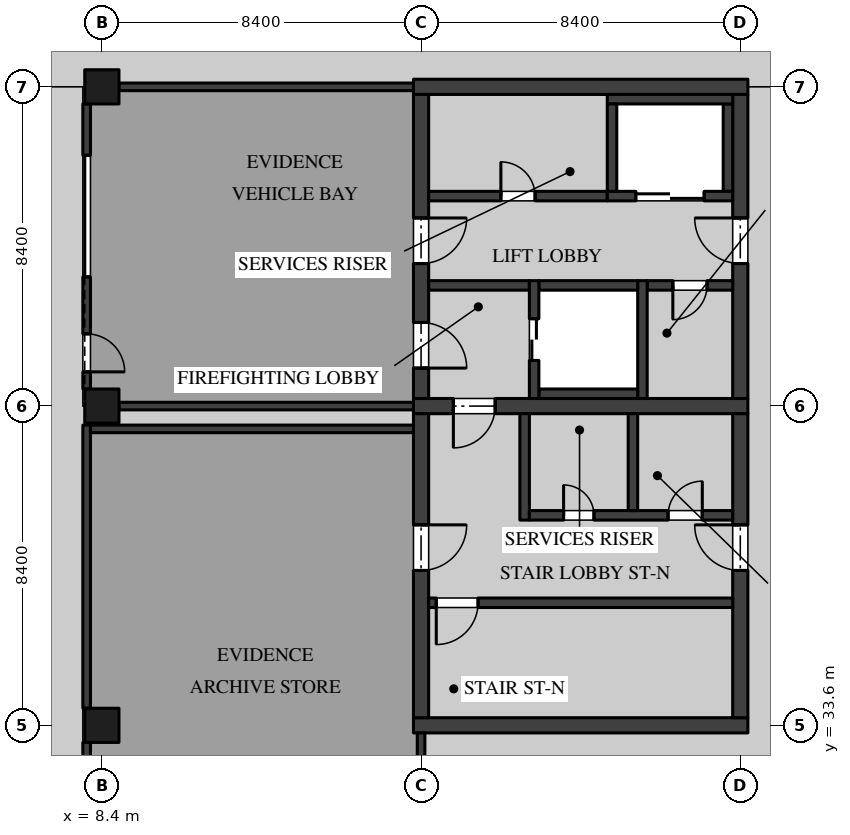
"""IFC4 building model, lengths in metres.
Left out: names, types, materials, properties, quantities, classifications, styles, units other than length and angle.
Written with IfcOpenShell. Run it as: python <this file> out.ifc"""

import sys

from ifc_helpers import new_model, si_unit, direction, frame, frame_2d, origin, origin_2d, place, context, subcontext, project, spatial, rectangle, extrude, element, fill, save


model = new_model("IFC4")
c1 = context("Model", 3, precision=1e-05, world=origin(), true_north=direction((0.0, 1.0)))
c2 = subcontext(c1, "Body", "Model", "MODEL_VIEW")
j1 = project(units=[si_unit("LENGTHUNIT", "METRE"), si_unit("PLANEANGLEUNIT", "RADIAN")], contexts=[c1])
p1 = place(None, origin())
s1 = spatial("IfcSite", under=j1, at=p1, CompositionType="ELEMENT")
p2 = place(p1, origin())
s2 = spatial("IfcBuilding", under=s1, at=p2, CompositionType="ELEMENT")
p3 = place(p2, frame((0.0, 0.0, -4.5)))
s3 = spatial("IfcBuildingStorey", under=s2, at=p3, CompositionType="ELEMENT", Elevation=-4.5)
for number, where, z_axis, x_axis in (
    (1, (8.4, 33.6, 0.0), (0.0, 0.0, 1.0), (1.0, 0.0, 0.0)),
    (2, (8.4, 42.0, 0.0), (0.0, 0.0, 1.0), (1.0, 0.0, 0.0)),
    (3, (8.4, 50.4, 0.0), (0.0, 0.0, 1.0), (1.0, 0.0, 0.0)),
):
    element("IfcColumn", number, at=place(p3, frame(where, z_axis=z_axis, x_axis=x_axis)), inside=s3, PredefinedType="COLUMN", context=c2, shape_type="SweptSolid", body=[
        extrude(rectangle(XDim=0.9, YDim=0.9, at=origin_2d()), origin(), (0.0, 0.0, 1.0), 4.05),
    ])
p4 = place(p3, frame((16.6, 42.0, 0.0), z_axis=(0.0, 0.0, 1.0), x_axis=(1.0, 0.0, 0.0)))
e4 = element("IfcWall", 4, at=p4, inside=s3, PredefinedType="SHEAR", context=c2, shape_type="SweptSolid", body=[
    extrude(rectangle(XDim=8.8, YDim=0.4, at=frame_2d((4.4, 0.0))), origin(), (0.0, 0.0, 1.0), 4.05),
])
p5 = place(p4, frame((1.05, 0.0, 0.0)))
e5 = element("IfcOpeningElement", 5, at=p5, cuts=e4, PredefinedType="OPENING", context=c2, shape_type="SweptSolid", body=[
    extrude(rectangle(XDim=1.1, YDim=2.1, at=frame_2d((0.55, 1.05))), frame((0.0, 0.21, 0.0), z_axis=(0.0, -1.0, 0.0), x_axis=(1.0, 0.0, 0.0)), (0.0, 0.0, 1.0), 0.42),
])
p6 = place(p3, frame((16.6, 50.4, 0.0), z_axis=(0.0, 0.0, 1.0), x_axis=(1.0, 0.0, 0.0)))
e6 = element("IfcWall", 6, at=p6, inside=s3, PredefinedType="SHEAR", context=c2, shape_type="SweptSolid", body=[
    extrude(rectangle(XDim=8.8, YDim=0.4, at=frame_2d((4.4, 0.0))), origin(), (0.0, 0.0, 1.0), 4.05),
])
p7 = place(p3, frame((16.8, 42.2, 0.0), z_axis=(0.0, 0.0, 1.0), x_axis=(0.0, 1.0, 0.0)))
e7 = element("IfcWall", 7, at=p7, inside=s3, PredefinedType="SHEAR", context=c2, shape_type="SweptSolid", body=[
    extrude(rectangle(XDim=8.0, YDim=0.4, at=frame_2d((4.0, 0.0))), origin(), (0.0, 0.0, 1.0), 4.05),
])
p8 = place(p7, frame((3.55, 0.0, 0.0)))
e8 = element("IfcOpeningElement", 8, at=p8, cuts=e7, PredefinedType="OPENING", context=c2, shape_type="SweptSolid", body=[
    extrude(rectangle(XDim=1.2, YDim=2.1, at=frame_2d((0.6, 1.05))), frame((0.0, 0.21, 0.0), z_axis=(0.0, -1.0, 0.0), x_axis=(1.0, 0.0, 0.0)), (0.0, 0.0, 1.0), 0.42),
])
p9 = place(p7, frame((0.8, 0.0, 0.0)))
e9 = element("IfcOpeningElement", 9, at=p9, cuts=e7, PredefinedType="OPENING", context=c2, shape_type="SweptSolid", body=[
    extrude(rectangle(XDim=1.2, YDim=2.1, at=frame_2d((0.6, 1.05))), frame((0.0, 0.21, 0.0), z_axis=(0.0, -1.0, 0.0), x_axis=(1.0, 0.0, 0.0)), (0.0, 0.0, 1.0), 0.42),
])
p10 = place(p3, frame((25.2, 42.2, 0.0), z_axis=(0.0, 0.0, 1.0), x_axis=(0.0, 1.0, 0.0)))
e10 = element("IfcWall", 10, at=p10, inside=s3, PredefinedType="SHEAR", context=c2, shape_type="SweptSolid", body=[
    extrude(rectangle(XDim=8.0, YDim=0.4, at=frame_2d((4.0, 0.0))), origin(), (0.0, 0.0, 1.0), 4.05),
])
p11 = place(p10, frame((3.55, 0.0, 0.0)))
e11 = element("IfcOpeningElement", 11, at=p11, cuts=e10, PredefinedType="OPENING", context=c2, shape_type="SweptSolid", body=[
    extrude(rectangle(XDim=1.2, YDim=2.1, at=frame_2d((0.6, 1.05))), frame((0.0, 0.21, 0.0), z_axis=(0.0, -1.0, 0.0), x_axis=(1.0, 0.0, 0.0)), (0.0, 0.0, 1.0), 0.42),
])
p12 = place(p3, frame((21.7, 47.525, 0.0), z_axis=(0.0, 0.0, 1.0), x_axis=(-1.0, 0.0, 0.0)))
e12 = element("IfcWall", 12, at=p12, inside=s3, PredefinedType="SOLIDWALL", context=c2, shape_type="SweptSolid", body=[
    extrude(rectangle(XDim=4.7, YDim=0.25, at=frame_2d((2.35, 0.0))), origin(), (0.0, 0.0, 1.0), 4.05),
])
p13 = place(p12, frame((1.9, 0.0, 0.0)))
e13 = element("IfcOpeningElement", 13, at=p13, cuts=e12, PredefinedType="OPENING", context=c2, shape_type="SweptSolid", body=[
    extrude(rectangle(XDim=0.9, YDim=2.1, at=frame_2d((0.45, 1.05))), frame((0.0, 0.135, 0.0), z_axis=(0.0, -1.0, 0.0), x_axis=(1.0, 0.0, 0.0)), (0.0, 0.0, 1.0), 0.27),
])
p14 = place(p3, frame((25.0, 45.175, 0.0), z_axis=(0.0, 0.0, 1.0), x_axis=(-1.0, 0.0, 0.0)))
e14 = element("IfcWall", 14, at=p14, inside=s3, PredefinedType="SOLIDWALL", context=c2, shape_type="SweptSolid", body=[
    extrude(rectangle(XDim=2.25, YDim=0.25, at=frame_2d((1.125, 0.0))), origin(), (0.0, 0.0, 1.0), 4.05),
])
p15 = place(p14, frame((0.675, 0.0, 0.0)))
e15 = element("IfcOpeningElement", 15, at=p15, cuts=e14, PredefinedType="OPENING", context=c2, shape_type="SweptSolid", body=[
    extrude(rectangle(XDim=0.9, YDim=2.1, at=frame_2d((0.45, 1.05))), frame((0.0, 0.135, 0.0), z_axis=(0.0, -1.0, 0.0), x_axis=(1.0, 0.0, 0.0)), (0.0, 0.0, 1.0), 0.27),
])
p16 = place(p3, frame((19.65, 45.175, 0.0), z_axis=(0.0, 0.0, 1.0), x_axis=(-1.0, 0.0, 0.0)))
e16 = element("IfcWall", 16, at=p16, inside=s3, PredefinedType="SOLIDWALL", context=c2, shape_type="SweptSolid", body=[
    extrude(rectangle(XDim=2.65, YDim=0.25, at=frame_2d((1.325, 0.0))), origin(), (0.0, 0.0, 1.0), 4.05),
])
p17 = place(p3, frame((16.6, 33.6, 0.0), z_axis=(0.0, 0.0, 1.0), x_axis=(1.0, 0.0, 0.0)))
e17 = element("IfcWall", 17, at=p17, inside=s3, PredefinedType="SHEAR", context=c2, shape_type="SweptSolid", body=[
    extrude(rectangle(XDim=8.8, YDim=0.4, at=frame_2d((4.4, 0.0))), origin(), (0.0, 0.0, 1.0), 4.05),
])
p18 = place(p3, frame((16.8, 33.8, 0.0), z_axis=(0.0, 0.0, 1.0), x_axis=(0.0, 1.0, 0.0)))
e18 = element("IfcWall", 18, at=p18, inside=s3, PredefinedType="SHEAR", context=c2, shape_type="SweptSolid", body=[
    extrude(rectangle(XDim=8.0, YDim=0.4, at=frame_2d((4.0, 0.0))), origin(), (0.0, 0.0, 1.0), 4.05),
])
p19 = place(p18, frame((3.875, 0.0, 0.0)))
e19 = element("IfcOpeningElement", 19, at=p19, cuts=e18, PredefinedType="OPENING", context=c2, shape_type="SweptSolid", body=[
    extrude(rectangle(XDim=1.2, YDim=2.1, at=frame_2d((0.6, 1.05))), frame((0.0, 0.21, 0.0), z_axis=(0.0, -1.0, 0.0), x_axis=(1.0, 0.0, 0.0)), (0.0, 0.0, 1.0), 0.42),
])
p20 = place(p3, frame((25.2, 33.8, 0.0), z_axis=(0.0, 0.0, 1.0), x_axis=(0.0, 1.0, 0.0)))
e20 = element("IfcWall", 20, at=p20, inside=s3, PredefinedType="SHEAR", context=c2, shape_type="SweptSolid", body=[
    extrude(rectangle(XDim=8.0, YDim=0.4, at=frame_2d((4.0, 0.0))), origin(), (0.0, 0.0, 1.0), 4.05),
])
p21 = place(p20, frame((3.875, 0.0, 0.0)))
e21 = element("IfcOpeningElement", 21, at=p21, cuts=e20, PredefinedType="OPENING", context=c2, shape_type="SweptSolid", body=[
    extrude(rectangle(XDim=1.2, YDim=2.1, at=frame_2d((0.6, 1.05))), frame((0.0, 0.21, 0.0), z_axis=(0.0, -1.0, 0.0), x_axis=(1.0, 0.0, 0.0)), (0.0, 0.0, 1.0), 0.42),
])
p22 = place(p3, frame((17.0, 36.825, 0.0), z_axis=(0.0, 0.0, 1.0), x_axis=(1.0, 0.0, 0.0)))
e22 = element("IfcWall", 22, at=p22, inside=s3, PredefinedType="SOLIDWALL", context=c2, shape_type="SweptSolid", body=[
    extrude(rectangle(XDim=8.0, YDim=0.25, at=frame_2d((4.0, 0.0))), origin(), (0.0, 0.0, 1.0), 4.05),
])
p23 = place(p22, frame((0.2, 0.0, 0.0)))
e23 = element("IfcOpeningElement", 23, at=p23, cuts=e22, PredefinedType="OPENING", context=c2, shape_type="SweptSolid", body=[
    extrude(rectangle(XDim=1.1, YDim=2.1, at=frame_2d((0.55, 1.05))), frame((0.0, 0.135, 0.0), z_axis=(0.0, -1.0, 0.0), x_axis=(1.0, 0.0, 0.0)), (0.0, 0.0, 1.0), 0.27),
])
p24 = place(p3, frame((19.525, 39.0, 0.0), z_axis=(0.0, 0.0, 1.0), x_axis=(0.0, 1.0, 0.0)))
e24 = element("IfcWall", 24, at=p24, inside=s3, PredefinedType="SOLIDWALL", context=c2, shape_type="SweptSolid", body=[
    extrude(rectangle(XDim=2.8, YDim=0.25, at=frame_2d((1.4, 0.0))), origin(), (0.0, 0.0, 1.0), 4.05),
])
p25 = place(p3, frame((19.65, 39.125, 0.0), z_axis=(0.0, 0.0, 1.0), x_axis=(1.0, 0.0, 0.0)))
e25 = element("IfcWall", 25, at=p25, inside=s3, PredefinedType="SOLIDWALL", context=c2, shape_type="SweptSolid", body=[
    extrude(rectangle(XDim=5.35, YDim=0.25, at=frame_2d((2.675, 0.0))), origin(), (0.0, 0.0, 1.0), 4.05),
])
p26 = place(p25, frame((3.65, 0.0, 0.0)))
e26 = element("IfcOpeningElement", 26, at=p26, cuts=e25, PredefinedType="OPENING", context=c2, shape_type="SweptSolid", body=[
    extrude(rectangle(XDim=0.9, YDim=2.1, at=frame_2d((0.45, 1.05))), frame((0.0, 0.135, 0.0), z_axis=(0.0, -1.0, 0.0), x_axis=(1.0, 0.0, 0.0)), (0.0, 0.0, 1.0), 0.27),
])
p27 = place(p25, frame((0.9, 0.0, 0.0)))
e27 = element("IfcOpeningElement", 27, at=p27, cuts=e25, PredefinedType="OPENING", context=c2, shape_type="SweptSolid", body=[
    extrude(rectangle(XDim=0.8, YDim=2.1, at=frame_2d((0.4, 1.05))), frame((0.0, 0.135, 0.0), z_axis=(0.0, -1.0, 0.0), x_axis=(1.0, 0.0, 0.0)), (0.0, 0.0, 1.0), 0.27),
])
p28 = place(p3, frame((22.375, 39.25, 0.0), z_axis=(0.0, 0.0, 1.0), x_axis=(0.0, 1.0, 0.0)))
e28 = element("IfcWall", 28, at=p28, inside=s3, PredefinedType="SOLIDWALL", context=c2, shape_type="SweptSolid", body=[
    extrude(rectangle(XDim=2.55, YDim=0.25, at=frame_2d((1.275, 0.0))), origin(), (0.0, 0.0, 1.0), 4.05),
])
p29 = place(p3, frame((24.875, 47.65, 0.0), z_axis=(0.0, 0.0, 1.0), x_axis=(0.0, 1.0, 0.0)))
e29 = element("IfcWall", 29, at=p29, inside=s3, PredefinedType="SOLIDWALL", context=c2, shape_type="SweptSolid", body=[
    extrude(rectangle(XDim=2.3, YDim=0.25, at=frame_2d((1.15, 0.0))), origin(), (0.0, 0.0, 1.0), 4.05),
])
p30 = place(p3, frame((21.7, 50.075, 0.0), z_axis=(0.0, 0.0, 1.0), x_axis=(1.0, 0.0, 0.0)))
e30 = element("IfcWall", 30, at=p30, inside=s3, PredefinedType="SOLIDWALL", context=c2, shape_type="SweptSolid", body=[
    extrude(rectangle(XDim=3.3, YDim=0.25, at=frame_2d((1.65, 0.0))), origin(), (0.0, 0.0, 1.0), 4.05),
])
p31 = place(p3, frame((21.7, 47.525, 0.0), z_axis=(0.0, 0.0, 1.0), x_axis=(1.0, 0.0, 0.0)))
e31 = element("IfcWall", 31, at=p31, inside=s3, PredefinedType="SOLIDWALL", context=c2, shape_type="SweptSolid", body=[
    extrude(rectangle(XDim=3.3, YDim=0.25, at=frame_2d((1.65, 0.0))), origin(), (0.0, 0.0, 1.0), 4.05),
])
p32 = place(p31, frame((0.75, 0.0, 0.0)))
e32 = element("IfcOpeningElement", 32, at=p32, cuts=e31, PredefinedType="OPENING", context=c2, shape_type="SweptSolid", body=[
    extrude(rectangle(XDim=1.8, YDim=2.1, at=frame_2d((0.9, 1.05))), frame((0.0, 0.135, 0.0), z_axis=(0.0, -1.0, 0.0), x_axis=(1.0, 0.0, 0.0)), (0.0, 0.0, 1.0), 0.27),
])
p33 = place(p3, frame((21.825, 47.65, 0.0), z_axis=(0.0, 0.0, 1.0), x_axis=(0.0, 1.0, 0.0)))
e33 = element("IfcWall", 33, at=p33, inside=s3, PredefinedType="SOLIDWALL", context=c2, shape_type="SweptSolid", body=[
    extrude(rectangle(XDim=2.3, YDim=0.25, at=frame_2d((1.15, 0.0))), origin(), (0.0, 0.0, 1.0), 4.05),
])
p34 = place(p3, frame((22.625, 42.2, 0.0), z_axis=(0.0, 0.0, 1.0), x_axis=(0.0, 1.0, 0.0)))
e34 = element("IfcWall", 34, at=p34, inside=s3, PredefinedType="SOLIDWALL", context=c2, shape_type="SweptSolid", body=[
    extrude(rectangle(XDim=3.1, YDim=0.25, at=frame_2d((1.55, 0.0))), origin(), (0.0, 0.0, 1.0), 4.05),
])
for number, where, z_axis, x_axis in (
    (35, (19.9, 45.175, 0.0), (0.0, 0.0, 1.0), (1.0, 0.0, 0.0)),
    (36, (19.9, 42.325, 0.0), (0.0, 0.0, 1.0), (1.0, 0.0, 0.0)),
):
    element("IfcWall", number, at=place(p3, frame(where, z_axis=z_axis, x_axis=x_axis)), inside=s3, PredefinedType="SOLIDWALL", context=c2, shape_type="SweptSolid", body=[
        extrude(rectangle(XDim=2.6, YDim=0.25, at=frame_2d((1.3, 0.0))), origin(), (0.0, 0.0, 1.0), 4.05),
    ])
p35 = place(p3, frame((19.775, 42.2, 0.0), z_axis=(0.0, 0.0, 1.0), x_axis=(0.0, 1.0, 0.0)))
e37 = element("IfcWall", 37, at=p35, inside=s3, PredefinedType="SOLIDWALL", context=c2, shape_type="SweptSolid", body=[
    extrude(rectangle(XDim=3.1, YDim=0.25, at=frame_2d((1.55, 0.0))), origin(), (0.0, 0.0, 1.0), 4.05),
])
p36 = place(p35, frame((1.0, 0.0, 0.0)))
e38 = element("IfcOpeningElement", 38, at=p36, cuts=e37, PredefinedType="OPENING", context=c2, shape_type="SweptSolid", body=[
    extrude(rectangle(XDim=1.1, YDim=2.1, at=frame_2d((0.55, 1.05))), frame((0.0, 0.135, 0.0), z_axis=(0.0, -1.0, 0.0), x_axis=(1.0, 0.0, 0.0)), (0.0, 0.0, 1.0), 0.27),
])
p37 = place(p3, frame((8.85, 50.4, 0.0), z_axis=(0.0, 0.0, 1.0), x_axis=(1.0, 0.0, 0.0)))
e39 = element("IfcWall", 39, at=p37, inside=s3, PredefinedType="PARTITIONING", context=c2, shape_type="SweptSolid", body=[
    extrude(rectangle(XDim=7.75, YDim=0.2, at=frame_2d((3.875, 0.0))), origin(), (0.0, 0.0, 1.0), 4.05),
])
p38 = place(p3, frame((8.0, 42.45, 0.0), z_axis=(0.0, 0.0, 1.0), x_axis=(0.0, 1.0, 0.0)))
e40 = element("IfcWall", 40, at=p38, inside=s3, PredefinedType="PARTITIONING", context=c2, shape_type="SweptSolid", body=[
    extrude(rectangle(XDim=7.5, YDim=0.2, at=frame_2d((3.75, 0.0))), origin(), (0.0, 0.0, 1.0), 4.05),
])
p39 = place(p38, frame((0.45, 0.0, 0.0)))
e41 = element("IfcOpeningElement", 41, at=p39, cuts=e40, PredefinedType="OPENING", context=c2, shape_type="SweptSolid", body=[
    extrude(rectangle(XDim=1.0, YDim=2.1, at=frame_2d((0.5, 1.05))), frame((0.0, 0.11, 0.0), z_axis=(0.0, -1.0, 0.0), x_axis=(1.0, 0.0, 0.0)), (0.0, 0.0, 1.0), 0.22),
])
p40 = place(p38, frame((2.95, 0.0, 0.0)))
e42 = element("IfcOpeningElement", 42, at=p40, cuts=e40, PredefinedType="OPENING", context=c2, shape_type="SweptSolid", body=[
    extrude(rectangle(XDim=3.2, YDim=3.0, at=frame_2d((1.6, 1.5))), frame((0.0, 0.11, 0.0), z_axis=(0.0, -1.0, 0.0), x_axis=(1.0, 0.0, 0.0)), (0.0, 0.0, 1.0), 0.22),
])
p41 = place(p3, frame((8.85, 42.0, 0.0), z_axis=(0.0, 0.0, 1.0), x_axis=(1.0, 0.0, 0.0)))
e43 = element("IfcWall", 43, at=p41, inside=s3, PredefinedType="PARTITIONING", context=c2, shape_type="SweptSolid", body=[
    extrude(rectangle(XDim=7.75, YDim=0.2, at=frame_2d((3.875, 0.0))), origin(), (0.0, 0.0, 1.0), 4.05),
])
p42 = place(p3, frame((8.0, 25.5, 0.0), z_axis=(0.0, 0.0, 1.0), x_axis=(0.0, 1.0, 0.0)))
e44 = element("IfcWall", 44, at=p42, inside=s3, PredefinedType="PARTITIONING", context=c2, shape_type="SweptSolid", body=[
    extrude(rectangle(XDim=7.65, YDim=0.2, at=frame_2d((3.825, 0.0))), origin(), (0.0, 0.0, 1.0), 4.05),
])
p43 = place(p3, frame((8.0, 34.05, 0.0), z_axis=(0.0, 0.0, 1.0), x_axis=(0.0, 1.0, 0.0)))
e45 = element("IfcWall", 45, at=p43, inside=s3, PredefinedType="PARTITIONING", context=c2, shape_type="SweptSolid", body=[
    extrude(rectangle(XDim=7.45, YDim=0.2, at=frame_2d((3.725, 0.0))), origin(), (0.0, 0.0, 1.0), 4.05),
])
p44 = place(p3, frame((8.1, 41.4, 0.0), z_axis=(0.0, 0.0, 1.0), x_axis=(1.0, 0.0, 0.0)))
e46 = element("IfcWall", 46, at=p44, inside=s3, PredefinedType="PARTITIONING", context=c2, shape_type="SweptSolid", body=[
    extrude(rectangle(XDim=8.5, YDim=0.2, at=frame_2d((4.25, 0.0))), origin(), (0.0, 0.0, 1.0), 4.05),
])
p45 = place(p3, frame((16.8, 25.7, 0.0), z_axis=(0.0, 0.0, 1.0), x_axis=(0.0, 1.0, 0.0)))
e47 = element("IfcWall", 47, at=p45, inside=s3, PredefinedType="PARTITIONING", context=c2, shape_type="SweptSolid", body=[
    extrude(rectangle(XDim=7.7, YDim=0.2, at=frame_2d((3.85, 0.0))), origin(), (0.0, 0.0, 1.0), 4.05),
])
p46 = place(p45, frame((3.8, 0.0, 0.0)))
e48 = element("IfcOpeningElement", 48, at=p46, cuts=e47, PredefinedType="OPENING", context=c2, shape_type="SweptSolid", body=[
    extrude(rectangle(XDim=1.0, YDim=2.1, at=frame_2d((0.5, 1.05))), frame((0.0, 0.11, 0.0), z_axis=(0.0, -1.0, 0.0), x_axis=(1.0, 0.0, 0.0)), (0.0, 0.0, 1.0), 0.22),
])
p47 = place(p8, frame((1.2, 0.0, 0.0), z_axis=(0.0, 0.0, 1.0), x_axis=(-1.0, 0.0, 0.0)))
e49 = element("IfcDoor", 49, at=p47, inside=s3, OperationType="SINGLE_SWING_RIGHT", PredefinedType="DOOR", context=c2, shape_type="SweptSolid", body=[
    extrude(rectangle(XDim=1.2, YDim=2.1, at=frame_2d((0.6, 1.05))), frame((0.0, 0.035, 0.0), z_axis=(0.0, -1.0, 0.0), x_axis=(1.0, 0.0, 0.0)), (0.0, 0.0, 1.0), 0.07),
])
fill(e8, e49)
p48 = place(p11, origin())
e50 = element("IfcDoor", 50, at=p48, inside=s3, OperationType="SINGLE_SWING_LEFT", PredefinedType="DOOR", context=c2, shape_type="SweptSolid", body=[
    extrude(rectangle(XDim=1.2, YDim=2.1, at=frame_2d((0.6, 1.05))), frame((0.0, 0.035, 0.0), z_axis=(0.0, -1.0, 0.0), x_axis=(1.0, 0.0, 0.0)), (0.0, 0.0, 1.0), 0.07),
])
fill(e11, e50)
p49 = place(p9, frame((1.2, 0.0, 0.0), z_axis=(0.0, 0.0, 1.0), x_axis=(-1.0, 0.0, 0.0)))
e51 = element("IfcDoor", 51, at=p49, inside=s3, OperationType="SINGLE_SWING_LEFT", PredefinedType="DOOR", context=c2, shape_type="SweptSolid", body=[
    extrude(rectangle(XDim=1.2, YDim=2.1, at=frame_2d((0.6, 1.05))), frame((0.0, 0.035, 0.0), z_axis=(0.0, -1.0, 0.0), x_axis=(1.0, 0.0, 0.0)), (0.0, 0.0, 1.0), 0.07),
])
fill(e9, e51)
p50 = place(p5, frame((1.1, 0.0, 0.0), z_axis=(0.0, 0.0, 1.0), x_axis=(-1.0, 0.0, 0.0)))
e52 = element("IfcDoor", 52, at=p50, inside=s3, OperationType="SINGLE_SWING_LEFT", PredefinedType="DOOR", context=c2, shape_type="SweptSolid", body=[
    extrude(rectangle(XDim=1.1, YDim=2.1, at=frame_2d((0.55, 1.05))), frame((0.0, 0.035, 0.0), z_axis=(0.0, -1.0, 0.0), x_axis=(1.0, 0.0, 0.0)), (0.0, 0.0, 1.0), 0.07),
])
fill(e5, e52)
p51 = place(p13, frame((0.9, 0.0, 0.0), z_axis=(0.0, 0.0, 1.0), x_axis=(-1.0, 0.0, 0.0)))
e53 = element("IfcDoor", 53, at=p51, inside=s3, OperationType="SINGLE_SWING_RIGHT", PredefinedType="DOOR", context=c2, shape_type="SweptSolid", body=[
    extrude(rectangle(XDim=0.9, YDim=2.1, at=frame_2d((0.45, 1.05))), frame((0.0, 0.035, 0.0), z_axis=(0.0, -1.0, 0.0), x_axis=(1.0, 0.0, 0.0)), (0.0, 0.0, 1.0), 0.07),
])
fill(e13, e53)
p52 = place(p15, origin())
e54 = element("IfcDoor", 54, at=p52, inside=s3, OperationType="SINGLE_SWING_LEFT", PredefinedType="DOOR", context=c2, shape_type="SweptSolid", body=[
    extrude(rectangle(XDim=0.9, YDim=2.1, at=frame_2d((0.45, 1.05))), frame((0.0, 0.05, 0.0), z_axis=(0.0, -1.0, 0.0), x_axis=(1.0, 0.0, 0.0)), (0.0, 0.0, 1.0), 0.1),
])
fill(e15, e54)
p53 = place(p26, origin())
e55 = element("IfcDoor", 55, at=p53, inside=s3, OperationType="SINGLE_SWING_LEFT", PredefinedType="DOOR", context=c2, shape_type="SweptSolid", body=[
    extrude(rectangle(XDim=0.9, YDim=2.1, at=frame_2d((0.45, 1.05))), frame((0.0, 0.035, 0.0), z_axis=(0.0, -1.0, 0.0), x_axis=(1.0, 0.0, 0.0)), (0.0, 0.0, 1.0), 0.07),
])
fill(e26, e55)
p54 = place(p19, frame((1.2, 0.0, 0.0), z_axis=(0.0, 0.0, 1.0), x_axis=(-1.0, 0.0, 0.0)))
e56 = element("IfcDoor", 56, at=p54, inside=s3, OperationType="SINGLE_SWING_RIGHT", PredefinedType="DOOR", context=c2, shape_type="SweptSolid", body=[
    extrude(rectangle(XDim=1.2, YDim=2.1, at=frame_2d((0.6, 1.05))), frame((0.0, 0.035, 0.0), z_axis=(0.0, -1.0, 0.0), x_axis=(1.0, 0.0, 0.0)), (0.0, 0.0, 1.0), 0.07),
])
fill(e19, e56)
p55 = place(p21, origin())
e57 = element("IfcDoor", 57, at=p55, inside=s3, OperationType="SINGLE_SWING_LEFT", PredefinedType="DOOR", context=c2, shape_type="SweptSolid", body=[
    extrude(rectangle(XDim=1.2, YDim=2.1, at=frame_2d((0.6, 1.05))), frame((0.0, 0.035, 0.0), z_axis=(0.0, -1.0, 0.0), x_axis=(1.0, 0.0, 0.0)), (0.0, 0.0, 1.0), 0.07),
])
fill(e21, e57)
p56 = place(p27, origin())
e58 = element("IfcDoor", 58, at=p56, inside=s3, OperationType="SINGLE_SWING_RIGHT", PredefinedType="DOOR", context=c2, shape_type="SweptSolid", body=[
    extrude(rectangle(XDim=0.8, YDim=2.1, at=frame_2d((0.4, 1.05))), frame((0.0, 0.035, 0.0), z_axis=(0.0, -1.0, 0.0), x_axis=(1.0, 0.0, 0.0)), (0.0, 0.0, 1.0), 0.07),
])
fill(e27, e58)
p57 = place(p23, frame((1.1, 0.0, 0.0), z_axis=(0.0, 0.0, 1.0), x_axis=(-1.0, 0.0, 0.0)))
e59 = element("IfcDoor", 59, at=p57, inside=s3, OperationType="SINGLE_SWING_LEFT", PredefinedType="DOOR", context=c2, shape_type="SweptSolid", body=[
    extrude(rectangle(XDim=1.1, YDim=2.1, at=frame_2d((0.55, 1.05))), frame((0.0, 0.035, 0.0), z_axis=(0.0, -1.0, 0.0), x_axis=(1.0, 0.0, 0.0)), (0.0, 0.0, 1.0), 0.07),
])
fill(e23, e59)
p58 = place(p32, origin())
e60 = element("IfcDoor", 60, at=p58, inside=s3, OperationType="DOUBLE_DOOR_SLIDING", PredefinedType="DOOR", context=c2, shape_type="SweptSolid", body=[
    extrude(rectangle(XDim=1.8, YDim=2.1, at=frame_2d((0.9, 1.05))), frame((0.0, 0.04, 0.0), z_axis=(0.0, -1.0, 0.0), x_axis=(1.0, 0.0, 0.0)), (0.0, 0.0, 1.0), 0.08),
])
fill(e32, e60)
p59 = place(p36, origin())
e61 = element("IfcDoor", 61, at=p59, inside=s3, OperationType="DOUBLE_DOOR_SLIDING", PredefinedType="DOOR", context=c2, shape_type="SweptSolid", body=[
    extrude(rectangle(XDim=1.1, YDim=2.1, at=frame_2d((0.55, 1.05))), frame((0.0, 0.04, 0.0), z_axis=(0.0, -1.0, 0.0), x_axis=(1.0, 0.0, 0.0)), (0.0, 0.0, 1.0), 0.08),
])
fill(e38, e61)
p60 = place(p39, frame((1.0, 0.0, 0.0), z_axis=(0.0, 0.0, 1.0), x_axis=(-1.0, 0.0, 0.0)))
e62 = element("IfcDoor", 62, at=p60, inside=s3, OperationType="SINGLE_SWING_LEFT", PredefinedType="DOOR", context=c2, shape_type="SweptSolid", body=[
    extrude(rectangle(XDim=1.0, YDim=2.1, at=frame_2d((0.5, 1.05))), frame((0.0, 0.045, 0.0), z_axis=(0.0, -1.0, 0.0), x_axis=(1.0, 0.0, 0.0)), (0.0, 0.0, 1.0), 0.09),
])
fill(e41, e62)
p61 = place(p40, origin())
e63 = element("IfcDoor", 63, at=p61, inside=s3, OperationType="SLIDING_TO_LEFT", PredefinedType="GATE", context=c2, shape_type="SweptSolid", body=[
    extrude(rectangle(XDim=3.2, YDim=3.0, at=frame_2d((1.6, 1.5))), frame((0.0, 0.025, 0.0), z_axis=(0.0, -1.0, 0.0), x_axis=(1.0, 0.0, 0.0)), (0.0, 0.0, 1.0), 0.05),
])
fill(e42, e63)
save(model, sys.argv[1])
